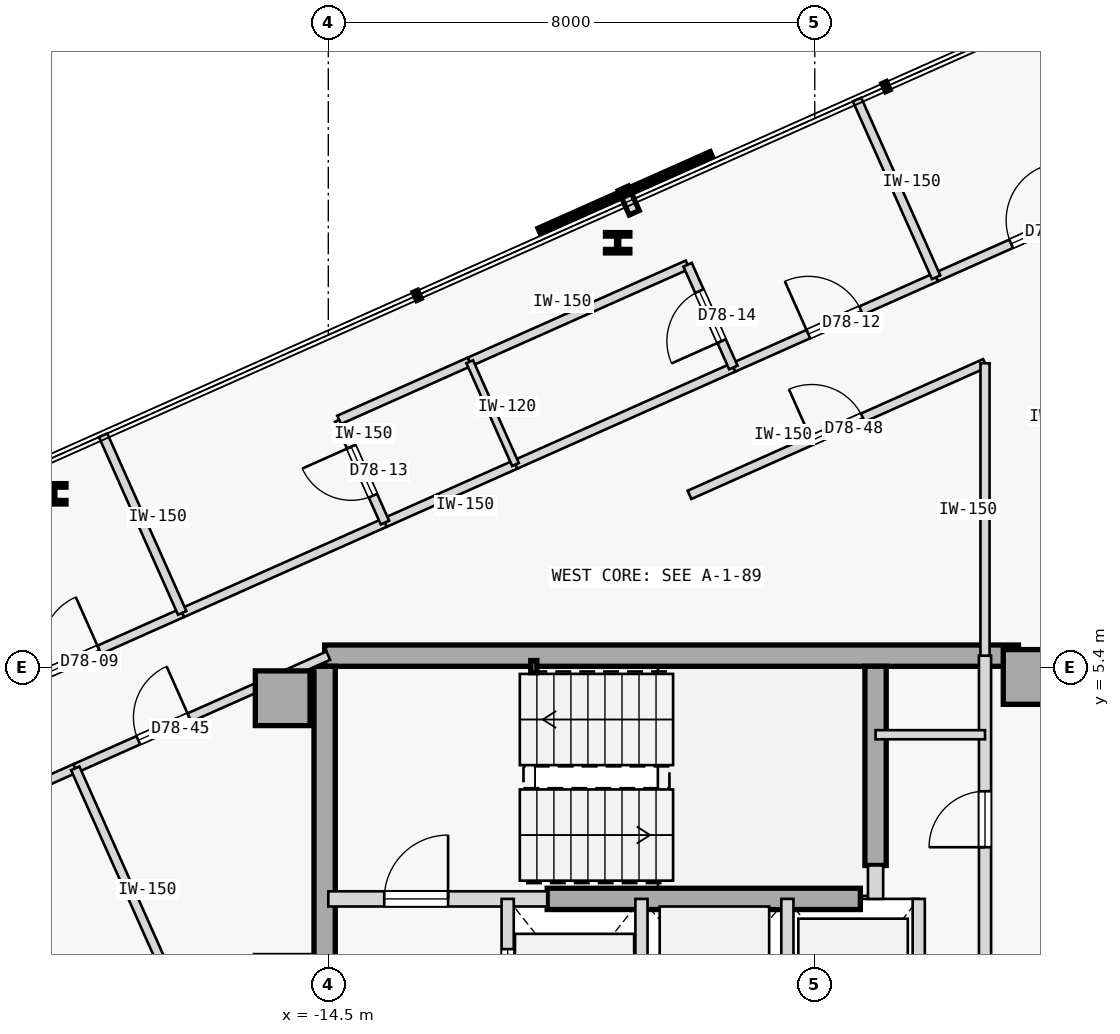
"""IFC4 building model, lengths in metres.
Left out: names, types, materials, properties, quantities, classifications, styles, units other than length and angle.
Written with IfcOpenShell. Run it as: python <this file> out.ifc"""

import sys

from ifc_helpers import new_model, si_unit, direction, frame, frame_2d, origin, origin_2d, place, context, subcontext, project, spatial, rectangle, hollow_rectangle, i_section, extrude, element, fill, save


model = new_model("IFC4")
c1 = context("Model", 3, precision=1e-05, world=origin(), true_north=direction((0.0, 1.0)))
c2 = subcontext(c1, "Body", "Model", "MODEL_VIEW")
j1 = project(units=[si_unit("LENGTHUNIT", "METRE"), si_unit("PLANEANGLEUNIT", "RADIAN")], contexts=[c1])
p1 = place(None, origin())
s1 = spatial("IfcSite", under=j1, at=p1, CompositionType="ELEMENT")
p2 = place(p1, origin())
s2 = spatial("IfcBuilding", under=s1, at=p2, CompositionType="ELEMENT")
p3 = place(p2, frame((0.0, 0.0, 291.95)))
s3 = spatial("IfcBuildingStorey", under=s2, at=p3, CompositionType="ELEMENT", Elevation=291.95)
for number, where, z_axis, x_axis in (
    (1, (-15.25, 4.9, 0.0), (0.0, 0.0, 1.0), (1.0, 0.0, 0.0)),
    (2, (-2.95, 5.25, 0.0), (0.0, 0.0, 1.0), (1.0, 0.0, 0.0)),
):
    element("IfcColumn", number, at=place(p3, frame(where, z_axis=z_axis, x_axis=x_axis)), inside=s3, PredefinedType="COLUMN", context=c2, shape_type="SweptSolid", body=[
        extrude(rectangle(XDim=0.9, YDim=0.9, at=origin_2d()), origin(), (0.0, 0.0, 1.0), 3.35),
    ])
p4 = place(p3, frame((-14.56, 5.6, 0.0), z_axis=(0.0, 0.0, 1.0), x_axis=(1.0, 0.0, 0.0)))
e3 = element("IfcWall", 3, at=p4, inside=s3, PredefinedType="SHEAR", context=c2, shape_type="SweptSolid", body=[
    extrude(rectangle(XDim=11.41, YDim=0.35, at=frame_2d((5.705, 0.0))), origin(), (0.0, 0.0, 1.0), 3.125),
])
p5 = place(p3, frame((-14.56, -5.425, 0.0), z_axis=(0.0, 0.0, 1.0), x_axis=(0.0, 1.0, 0.0)))
e4 = element("IfcWall", 4, at=p5, inside=s3, PredefinedType="SHEAR", context=c2, shape_type="SweptSolid", body=[
    extrude(rectangle(XDim=10.85, YDim=0.35, at=frame_2d((5.425, 0.0))), origin(), (0.0, 0.0, 1.0), 3.125),
])
p6 = place(p3, frame((-5.5, 2.15, 0.0), z_axis=(0.0, 0.0, 1.0), x_axis=(0.0, 1.0, 0.0)))
e5 = element("IfcWall", 5, at=p6, inside=s3, PredefinedType="SHEAR", context=c2, shape_type="SweptSolid", body=[
    extrude(rectangle(XDim=3.275, YDim=0.35, at=frame_2d((1.638, 0.0))), origin(), (0.0, 0.0, 1.0), 3.125),
])
p7 = place(p3, frame((-10.9, 1.6, 0.0), z_axis=(0.0, 0.0, 1.0), x_axis=(1.0, 0.0, 0.0)))
e6 = element("IfcWall", 6, at=p7, inside=s3, PredefinedType="SHEAR", context=c2, shape_type="SweptSolid", body=[
    extrude(rectangle(XDim=5.15, YDim=0.35, at=frame_2d((2.575, 0.0))), origin(), (0.0, 0.0, 1.0), 3.125),
])
p8 = place(p3, frame((-11.12, 5.42, 0.0), z_axis=(0.0, 0.0, 1.0), x_axis=(1.0, 0.0, 0.0)))
e7 = element("IfcColumn", 7, at=p8, inside=s3, PredefinedType="COLUMN", context=c2, shape_type="SweptSolid", body=[
    extrude(hollow_rectangle(XDim=0.1, YDim=0.2, WallThickness=0.008, at=origin_2d()), origin(), (0.0, 0.0, 1.0), 3.35),
])
for number, where, z_axis, x_axis in (
    (8, (-9.741, 12.39, 0.0), (0.0, 0.0, 1.0), (1.0, 0.0, 0.0)),
    (9, (-19.015, 8.262, 0.0), (0.0, 0.0, 1.0), (1.0, 0.0, 0.0)),
):
    element("IfcColumn", number, at=place(p3, frame(where, z_axis=z_axis, x_axis=x_axis)), inside=s3, PredefinedType="COLUMN", context=c2, shape_type="SweptSolid", body=[
        extrude(i_section(OverallWidth=0.401, OverallDepth=0.335, WebThickness=0.036, FlangeThickness=0.058, FilletRadius=0.015, at=origin_2d()), origin(), (0.0, 0.0, 1.0), 3.35),
    ])
p9 = place(p3, frame((-14.5, 1.6, 0.0), z_axis=(0.0, 0.0, 1.0), x_axis=(1.0, 0.0, 0.0)))
e10 = element("IfcWall", 10, at=p9, inside=s3, PredefinedType="STANDARD", context=c2, shape_type="SweptSolid", body=[
    extrude(rectangle(XDim=3.6, YDim=0.25, at=frame_2d((1.8, 0.0))), origin(), (0.0, 0.0, 1.0), 3.125),
])
p10 = place(p9, frame((0.92, 0.0, 0.0)))
e11 = element("IfcOpeningElement", 11, at=p10, cuts=e10, PredefinedType="OPENING", context=c2, shape_type="SweptSolid", body=[
    extrude(rectangle(XDim=1.05, YDim=2.15, at=frame_2d((0.525, 1.075))), frame((0.0, 0.135, 0.0), z_axis=(0.0, -1.0, 0.0), x_axis=(1.0, 0.0, 0.0)), (0.0, 0.0, 1.0), 0.27),
])
p11 = place(p3, frame((-5.5, 1.6, 0.0), z_axis=(0.0, 0.0, 1.0), x_axis=(0.0, 1.0, 0.0)))
e12 = element("IfcWall", 12, at=p11, inside=s3, PredefinedType="STANDARD", context=c2, shape_type="SweptSolid", body=[
    extrude(rectangle(XDim=0.55, YDim=0.25, at=frame_2d((0.275, 0.0))), origin(), (0.0, 0.0, 1.0), 3.125),
])
p12 = place(p3, frame((-3.7, -1.15, 0.0), z_axis=(0.0, 0.0, 1.0), x_axis=(0.0, 1.0, 0.0)))
e13 = element("IfcWall", 13, at=p12, inside=s3, PredefinedType="STANDARD", context=c2, shape_type="SweptSolid", body=[
    extrude(rectangle(XDim=6.75, YDim=0.2, at=frame_2d((3.375, 0.0))), origin(), (0.0, 0.0, 1.0), 3.125),
])
p13 = place(p12, frame((3.6, 0.0, 0.0)))
e14 = element("IfcOpeningElement", 14, at=p13, cuts=e13, PredefinedType="OPENING", context=c2, shape_type="SweptSolid", body=[
    extrude(rectangle(XDim=0.92, YDim=2.15, at=frame_2d((0.46, 1.075))), frame((0.0, 0.11, 0.0), z_axis=(0.0, -1.0, 0.0), x_axis=(1.0, 0.0, 0.0)), (0.0, 0.0, 1.0), 0.22),
])
p14 = place(p3, frame((-11.55, -1.15, 0.0), z_axis=(0.0, 0.0, 1.0), x_axis=(0.0, 1.0, 0.0)))
e15 = element("IfcWall", 15, at=p14, inside=s3, PredefinedType="STANDARD", context=c2, shape_type="SweptSolid", body=[
    extrude(rectangle(XDim=2.75, YDim=0.2, at=frame_2d((1.375, 0.0))), origin(), (0.0, 0.0, 1.0), 3.125),
])
p15 = place(p14, frame((0.825, 0.0, 0.0)))
e16 = element("IfcOpeningElement", 16, at=p15, cuts=e15, PredefinedType="OPENING", context=c2, shape_type="SweptSolid", body=[
    extrude(rectangle(XDim=1.1, YDim=2.15, at=frame_2d((0.55, 1.075))), frame((0.0, 0.11, 0.0), z_axis=(0.0, -1.0, 0.0), x_axis=(1.0, 0.0, 0.0)), (0.0, 0.0, 1.0), 0.22),
])
for number, where, z_axis, x_axis in (
    (17, (-9.35, -1.15, 0.0), (0.0, 0.0, 1.0), (0.0, 1.0, 0.0)),
    (18, (-6.95, -1.15, 0.0), (0.0, 0.0, 1.0), (0.0, 1.0, 0.0)),
    (19, (-4.79, -1.15, 0.0), (0.0, 0.0, 1.0), (0.0, 1.0, 0.0)),
):
    element("IfcWall", number, at=place(p3, frame(where, z_axis=z_axis, x_axis=x_axis)), inside=s3, PredefinedType="STANDARD", context=c2, shape_type="SweptSolid", body=[
        extrude(rectangle(XDim=2.75, YDim=0.2, at=frame_2d((1.375, 0.0))), origin(), (0.0, 0.0, 1.0), 3.125),
    ])
p16 = place(p3, frame((-5.5, 4.3, 0.0), z_axis=(0.0, 0.0, 1.0), x_axis=(1.0, 0.0, 0.0)))
e20 = element("IfcWall", 20, at=p16, inside=s3, PredefinedType="PARTITIONING", context=c2, shape_type="SweptSolid", body=[
    extrude(rectangle(XDim=1.8, YDim=0.15, at=frame_2d((0.9, 0.0))), origin(), (0.0, 0.0, 1.0), 3.125),
])
p17 = place(p3, frame((-20.499, 4.702, 0.0), z_axis=(0.0, 0.0, 1.0), x_axis=(0.913553019012, 0.406719659537, 0.0)))
e21 = element("IfcWall", 21, at=p17, inside=s3, PredefinedType="PARTITIONING", context=c2, shape_type="SweptSolid", body=[
    extrude(rectangle(XDim=3.936, YDim=0.15, at=frame_2d((1.968, 0.0))), origin(), (0.0, 0.0, 1.0), 3.125),
])
p18 = place(p17, frame((1.493, 0.0, 0.0)))
e22 = element("IfcOpeningElement", 22, at=p18, cuts=e21, PredefinedType="OPENING", context=c2, shape_type="SweptSolid", body=[
    extrude(rectangle(XDim=0.95, YDim=2.15, at=frame_2d((0.475, 1.075))), frame((0.0, 0.085, 0.0), z_axis=(0.0, -1.0, 0.0), x_axis=(1.0, 0.0, 0.0)), (0.0, 0.0, 1.0), 0.17),
])
p19 = place(p3, frame((-16.903, 6.303, 0.0), z_axis=(0.0, 0.0, 1.0), x_axis=(0.913543802, 0.40674036169, 0.0)))
e23 = element("IfcWall", 23, at=p19, inside=s3, PredefinedType="PARTITIONING", context=c2, shape_type="SweptSolid", body=[
    extrude(rectangle(XDim=3.65, YDim=0.15, at=frame_2d((1.825, 0.0))), origin(), (0.0, 0.0, 1.0), 3.125),
])
p20 = place(p3, frame((-7.839, 10.339, 0.0), z_axis=(0.0, 0.0, 1.0), x_axis=(0.913543802, 0.40674036169, 0.0)))
e24 = element("IfcWall", 24, at=p20, inside=s3, PredefinedType="PARTITIONING", context=c2, shape_type="SweptSolid", body=[
    extrude(rectangle(XDim=3.65, YDim=0.15, at=frame_2d((1.825, 0.0))), origin(), (0.0, 0.0, 1.0), 3.125),
])
p21 = place(p20, frame((1.35, 0.0, 0.0)))
e25 = element("IfcOpeningElement", 25, at=p21, cuts=e24, PredefinedType="OPENING", context=c2, shape_type="SweptSolid", body=[
    extrude(rectangle(XDim=0.95, YDim=2.15, at=frame_2d((0.475, 1.075))), frame((0.0, 0.085, 0.0), z_axis=(0.0, -1.0, 0.0), x_axis=(1.0, 0.0, 0.0)), (0.0, 0.0, 1.0), 0.17),
])
p22 = place(p3, frame((-13.568, 7.788, 0.0), z_axis=(0.0, 0.0, 1.0), x_axis=(0.913558622212, 0.406707073682, 0.0)))
e26 = element("IfcWall", 26, at=p22, inside=s3, PredefinedType="PARTITIONING", context=c2, shape_type="SweptSolid", body=[
    extrude(rectangle(XDim=2.35, YDim=0.15, at=frame_2d((1.175, 0.0))), origin(), (0.0, 0.0, 1.0), 3.125),
])
p23 = place(p3, frame((-11.421, 8.744, 0.0), z_axis=(0.0, 0.0, 1.0), x_axis=(0.913539234326, 0.406750620585, 0.0)))
e27 = element("IfcWall", 27, at=p23, inside=s3, PredefinedType="PARTITIONING", context=c2, shape_type="SweptSolid", body=[
    extrude(rectangle(XDim=3.922, YDim=0.15, at=frame_2d((1.961, 0.0))), origin(), (0.0, 0.0, 1.0), 3.125),
])
p24 = place(p3, frame((-4.504, 11.823, 0.0), z_axis=(0.0, 0.0, 1.0), x_axis=(0.913543802, 0.40674036169, 0.0)))
e28 = element("IfcWall", 28, at=p24, inside=s3, PredefinedType="PARTITIONING", context=c2, shape_type="SweptSolid", body=[
    extrude(rectangle(XDim=3.65, YDim=0.15, at=frame_2d((1.825, 0.0))), origin(), (0.0, 0.0, 1.0), 3.125),
])
p25 = place(p24, frame((1.35, 0.0, 0.0)))
e29 = element("IfcOpeningElement", 29, at=p25, cuts=e28, PredefinedType="OPENING", context=c2, shape_type="SweptSolid", body=[
    extrude(rectangle(XDim=0.95, YDim=2.15, at=frame_2d((0.475, 1.075))), frame((0.0, 0.085, 0.0), z_axis=(0.0, -1.0, 0.0), x_axis=(1.0, 0.0, 0.0)), (0.0, 0.0, 1.0), 0.17),
])
p26 = place(p3, frame((-29.404, -1.036, 0.0), z_axis=(0.0, 0.0, 1.0), x_axis=(0.913544247064, 0.406739362069, 0.0)))
e30 = element("IfcWall", 30, at=p26, inside=s3, PredefinedType="PARTITIONING", context=c2, shape_type="SweptSolid", body=[
    extrude(rectangle(XDim=11.76, YDim=0.15, at=frame_2d((5.88, 0.0))), origin(), (0.0, 0.0, 1.0), 3.125),
])
p27 = place(p26, frame((5.42, 0.0, 0.0)))
e31 = element("IfcOpeningElement", 31, at=p27, cuts=e30, PredefinedType="OPENING", context=c2, shape_type="SweptSolid", body=[
    extrude(rectangle(XDim=0.92, YDim=2.15, at=frame_2d((0.46, 1.075))), frame((0.0, 0.085, 0.0), z_axis=(0.0, -1.0, 0.0), x_axis=(1.0, 0.0, 0.0)), (0.0, 0.0, 1.0), 0.17),
])
p28 = place(p3, frame((-18.661, 3.747, 0.0), z_axis=(0.0, 0.0, 1.0), x_axis=(0.913535055583, 0.40676000568, 0.0)))
e32 = element("IfcWall", 32, at=p28, inside=s3, PredefinedType="PARTITIONING", context=c2, shape_type="SweptSolid", body=[
    extrude(rectangle(XDim=4.555, YDim=0.15, at=frame_2d((2.277, 0.0))), origin(), (0.0, 0.0, 1.0), 3.125),
])
p29 = place(p28, frame((1.134, 0.0, 0.0)))
e33 = element("IfcOpeningElement", 33, at=p29, cuts=e32, PredefinedType="OPENING", context=c2, shape_type="SweptSolid", body=[
    extrude(rectangle(XDim=0.92, YDim=2.15, at=frame_2d((0.46, 1.075))), frame((0.0, 0.085, 0.0), z_axis=(0.0, -1.0, 0.0), x_axis=(1.0, 0.0, 0.0)), (0.0, 0.0, 1.0), 0.17),
])
p30 = place(p3, frame((-8.56, 8.244, 0.0), z_axis=(0.0, 0.0, 1.0), x_axis=(0.91354831274, 0.406730230362, 0.0)))
e34 = element("IfcWall", 34, at=p30, inside=s3, PredefinedType="PARTITIONING", context=c2, shape_type="SweptSolid", body=[
    extrude(rectangle(XDim=5.32, YDim=0.15, at=frame_2d((2.66, 0.0))), origin(), (0.0, 0.0, 1.0), 3.125),
])
p31 = place(p30, frame((2.2, 0.0, 0.0)))
e35 = element("IfcOpeningElement", 35, at=p31, cuts=e34, PredefinedType="OPENING", context=c2, shape_type="SweptSolid", body=[
    extrude(rectangle(XDim=0.92, YDim=2.15, at=frame_2d((0.46, 1.075))), frame((0.0, 0.085, 0.0), z_axis=(0.0, -1.0, 0.0), x_axis=(1.0, 0.0, 0.0)), (0.0, 0.0, 1.0), 0.17),
])
p32 = place(p3, frame((-3.7, 5.6, 0.0), z_axis=(0.0, 0.0, 1.0), x_axis=(5.077173e-05, 0.999999998711, 0.0)))
e36 = element("IfcWall", 36, at=p32, inside=s3, PredefinedType="PARTITIONING", context=c2, shape_type="SweptSolid", body=[
    extrude(rectangle(XDim=4.809, YDim=0.15, at=frame_2d((2.404, 0.0))), origin(), (0.0, 0.0, 1.0), 3.125),
])
p33 = place(p3, frame((-16.903, 6.303, 0.0), z_axis=(0.0, 0.0, 1.0), x_axis=(-0.406733350739, 0.913546923478, 0.0)))
e37 = element("IfcWall", 37, at=p33, inside=s3, PredefinedType="PARTITIONING", context=c2, shape_type="SweptSolid", body=[
    extrude(rectangle(XDim=3.198, YDim=0.15, at=frame_2d((1.599, 0.0))), origin(), (0.0, 0.0, 1.0), 3.125),
])
p34 = place(p3, frame((-13.568, 7.788, 0.0), z_axis=(0.0, 0.0, 1.0), x_axis=(-0.406750635596, 0.913539227643, 0.0)))
e38 = element("IfcWall", 38, at=p34, inside=s3, PredefinedType="PARTITIONING", context=c2, shape_type="SweptSolid", body=[
    extrude(rectangle(XDim=1.85, YDim=0.15, at=frame_2d((0.925, 0.0))), origin(), (0.0, 0.0, 1.0), 3.125),
])
p35 = place(p34, frame((0.485, 0.0, 0.0)))
e39 = element("IfcOpeningElement", 39, at=p35, cuts=e38, PredefinedType="OPENING", context=c2, shape_type="SweptSolid", body=[
    extrude(rectangle(XDim=0.88, YDim=2.15, at=frame_2d((0.44, 1.075))), frame((0.0, 0.085, 0.0), z_axis=(0.0, -1.0, 0.0), x_axis=(1.0, 0.0, 0.0)), (0.0, 0.0, 1.0), 0.17),
])
p36 = place(p3, frame((-14.321, 9.478, 0.0), z_axis=(0.0, 0.0, 1.0), x_axis=(0.913502828817, 0.406832375486, 0.0)))
e40 = element("IfcWall", 40, at=p36, inside=s3, PredefinedType="PARTITIONING", context=c2, shape_type="SweptSolid", body=[
    extrude(rectangle(XDim=2.35, YDim=0.15, at=frame_2d((1.175, 0.0))), origin(), (0.0, 0.0, 1.0), 3.125),
])
p37 = place(p3, frame((-12.174, 10.434, 0.0), z_axis=(0.0, 0.0, 1.0), x_axis=(0.913549532696, 0.406727490232, 0.0)))
e41 = element("IfcWall", 41, at=p37, inside=s3, PredefinedType="PARTITIONING", context=c2, shape_type="SweptSolid", body=[
    extrude(rectangle(XDim=3.922, YDim=0.15, at=frame_2d((1.961, 0.0))), origin(), (0.0, 0.0, 1.0), 3.125),
])
p38 = place(p3, frame((-7.839, 10.339, 0.0), z_axis=(0.0, 0.0, 1.0), x_axis=(-0.406701600856, 0.913561058639, 0.0)))
e42 = element("IfcWall", 42, at=p38, inside=s3, PredefinedType="PARTITIONING", context=c2, shape_type="SweptSolid", body=[
    extrude(rectangle(XDim=1.85, YDim=0.15, at=frame_2d((0.925, 0.0))), origin(), (0.0, 0.0, 1.0), 3.125),
])
p39 = place(p38, frame((0.475, 0.0, 0.0)))
e43 = element("IfcOpeningElement", 43, at=p39, cuts=e42, PredefinedType="OPENING", context=c2, shape_type="SweptSolid", body=[
    extrude(rectangle(XDim=0.9, YDim=2.15, at=frame_2d((0.45, 1.075))), frame((0.0, 0.085, 0.0), z_axis=(0.0, -1.0, 0.0), x_axis=(1.0, 0.0, 0.0)), (0.0, 0.0, 1.0), 0.17),
])
p40 = place(p3, frame((-4.504, 11.823, 0.0), z_axis=(0.0, 0.0, 1.0), x_axis=(-0.406733350739, 0.913546923478, 0.0)))
e44 = element("IfcWall", 44, at=p40, inside=s3, PredefinedType="PARTITIONING", context=c2, shape_type="SweptSolid", body=[
    extrude(rectangle(XDim=3.198, YDim=0.15, at=frame_2d((1.599, 0.0))), origin(), (0.0, 0.0, 1.0), 3.125),
])
p41 = place(p3, frame((-11.421, 8.744, 0.0), z_axis=(0.0, 0.0, 1.0), x_axis=(-0.406811725227, 0.913512025218, 0.0)))
e45 = element("IfcWall", 45, at=p41, inside=s3, PredefinedType="PARTITIONING", context=c2, shape_type="SweptSolid", body=[
    extrude(rectangle(XDim=1.85, YDim=0.12, at=frame_2d((0.925, 0.0))), origin(), (0.0, 0.0, 1.0), 3.125),
])
p42 = place(p3, frame((-16.789, -0.459, 0.0), z_axis=(0.0, 0.0, 1.0), x_axis=(-0.406738654026, 0.913544562307, 0.0)))
e46 = element("IfcWall", 46, at=p42, inside=s3, PredefinedType="PARTITIONING", context=c2, shape_type="SweptSolid", body=[
    extrude(rectangle(XDim=4.604, YDim=0.15, at=frame_2d((2.302, 0.0))), origin(), (0.0, 0.0, 1.0), 3.125),
])
p43 = place(p10, origin())
e47 = element("IfcDoor", 47, at=p43, inside=s3, OperationType="SINGLE_SWING_RIGHT", PredefinedType="DOOR", context=c2, shape_type="SweptSolid", body=[
    extrude(rectangle(XDim=1.05, YDim=2.15, at=frame_2d((0.525, 1.075))), frame((0.0, 0.025, 0.0), z_axis=(0.0, -1.0, 0.0), x_axis=(1.0, 0.0, 0.0)), (0.0, 0.0, 1.0), 0.05),
])
fill(e11, e47)
p44 = place(p15, origin())
e48 = element("IfcDoor", 48, at=p44, inside=s3, OperationType="SLIDING_TO_RIGHT", PredefinedType="DOOR", context=c2, shape_type="SweptSolid", body=[
    extrude(rectangle(XDim=1.1, YDim=2.15, at=frame_2d((0.55, 1.075))), frame((0.0, 0.025, 0.0), z_axis=(0.0, -1.0, 0.0), x_axis=(1.0, 0.0, 0.0)), (0.0, 0.0, 1.0), 0.05),
])
fill(e16, e48)
p45 = place(p13, origin())
e49 = element("IfcDoor", 49, at=p45, inside=s3, OperationType="SINGLE_SWING_LEFT", PredefinedType="DOOR", context=c2, shape_type="SweptSolid", body=[
    extrude(rectangle(XDim=0.92, YDim=2.15, at=frame_2d((0.46, 1.075))), frame((0.0, 0.025, 0.0), z_axis=(0.0, -1.0, 0.0), x_axis=(1.0, 0.0, 0.0)), (0.0, 0.0, 1.0), 0.05),
])
fill(e14, e49)
p46 = place(p18, origin())
e50 = element("IfcDoor", 50, at=p46, inside=s3, OperationType="SINGLE_SWING_RIGHT", PredefinedType="DOOR", context=c2, shape_type="SweptSolid", body=[
    extrude(rectangle(XDim=0.95, YDim=2.15, at=frame_2d((0.475, 1.075))), frame((0.0, 0.025, 0.0), z_axis=(0.0, -1.0, 0.0), x_axis=(1.0, 0.0, 0.0)), (0.0, 0.0, 1.0), 0.05),
])
fill(e22, e50)
p47 = place(p21, origin())
e51 = element("IfcDoor", 51, at=p47, inside=s3, OperationType="SINGLE_SWING_LEFT", PredefinedType="DOOR", context=c2, shape_type="SweptSolid", body=[
    extrude(rectangle(XDim=0.95, YDim=2.15, at=frame_2d((0.475, 1.075))), frame((0.0, 0.025, 0.0), z_axis=(0.0, -1.0, 0.0), x_axis=(1.0, 0.0, 0.0)), (0.0, 0.0, 1.0), 0.05),
])
fill(e25, e51)
p48 = place(p35, origin())
e52 = element("IfcDoor", 52, at=p48, inside=s3, OperationType="SINGLE_SWING_RIGHT", PredefinedType="DOOR", context=c2, shape_type="SweptSolid", body=[
    extrude(rectangle(XDim=0.88, YDim=2.15, at=frame_2d((0.44, 1.075))), frame((0.0, 0.025, 0.0), z_axis=(0.0, -1.0, 0.0), x_axis=(1.0, 0.0, 0.0)), (0.0, 0.0, 1.0), 0.05),
])
fill(e39, e52)
p49 = place(p39, origin())
e53 = element("IfcDoor", 53, at=p49, inside=s3, OperationType="SINGLE_SWING_LEFT", PredefinedType="DOOR", context=c2, shape_type="SweptSolid", body=[
    extrude(rectangle(XDim=0.9, YDim=2.15, at=frame_2d((0.45, 1.075))), frame((0.0, 0.025, 0.0), z_axis=(0.0, -1.0, 0.0), x_axis=(1.0, 0.0, 0.0)), (0.0, 0.0, 1.0), 0.05),
])
fill(e43, e53)
p50 = place(p25, origin())
e54 = element("IfcDoor", 54, at=p50, inside=s3, OperationType="SINGLE_SWING_RIGHT", PredefinedType="DOOR", context=c2, shape_type="SweptSolid", body=[
    extrude(rectangle(XDim=0.95, YDim=2.15, at=frame_2d((0.475, 1.075))), frame((0.0, 0.025, 0.0), z_axis=(0.0, -1.0, 0.0), x_axis=(1.0, 0.0, 0.0)), (0.0, 0.0, 1.0), 0.05),
])
fill(e29, e54)
p51 = place(p29, origin())
e55 = element("IfcDoor", 55, at=p51, inside=s3, OperationType="SINGLE_SWING_RIGHT", PredefinedType="DOOR", context=c2, shape_type="SweptSolid", body=[
    extrude(rectangle(XDim=0.92, YDim=2.15, at=frame_2d((0.46, 1.075))), frame((0.0, 0.025, 0.0), z_axis=(0.0, -1.0, 0.0), x_axis=(1.0, 0.0, 0.0)), (0.0, 0.0, 1.0), 0.05),
])
fill(e33, e55)
p52 = place(p31, origin())
e56 = element("IfcDoor", 56, at=p52, inside=s3, OperationType="SINGLE_SWING_LEFT", PredefinedType="DOOR", context=c2, shape_type="SweptSolid", body=[
    extrude(rectangle(XDim=0.92, YDim=2.15, at=frame_2d((0.46, 1.075))), frame((0.0, 0.025, 0.0), z_axis=(0.0, -1.0, 0.0), x_axis=(1.0, 0.0, 0.0)), (0.0, 0.0, 1.0), 0.05),
])
fill(e35, e56)
save(model, sys.argv[1])
